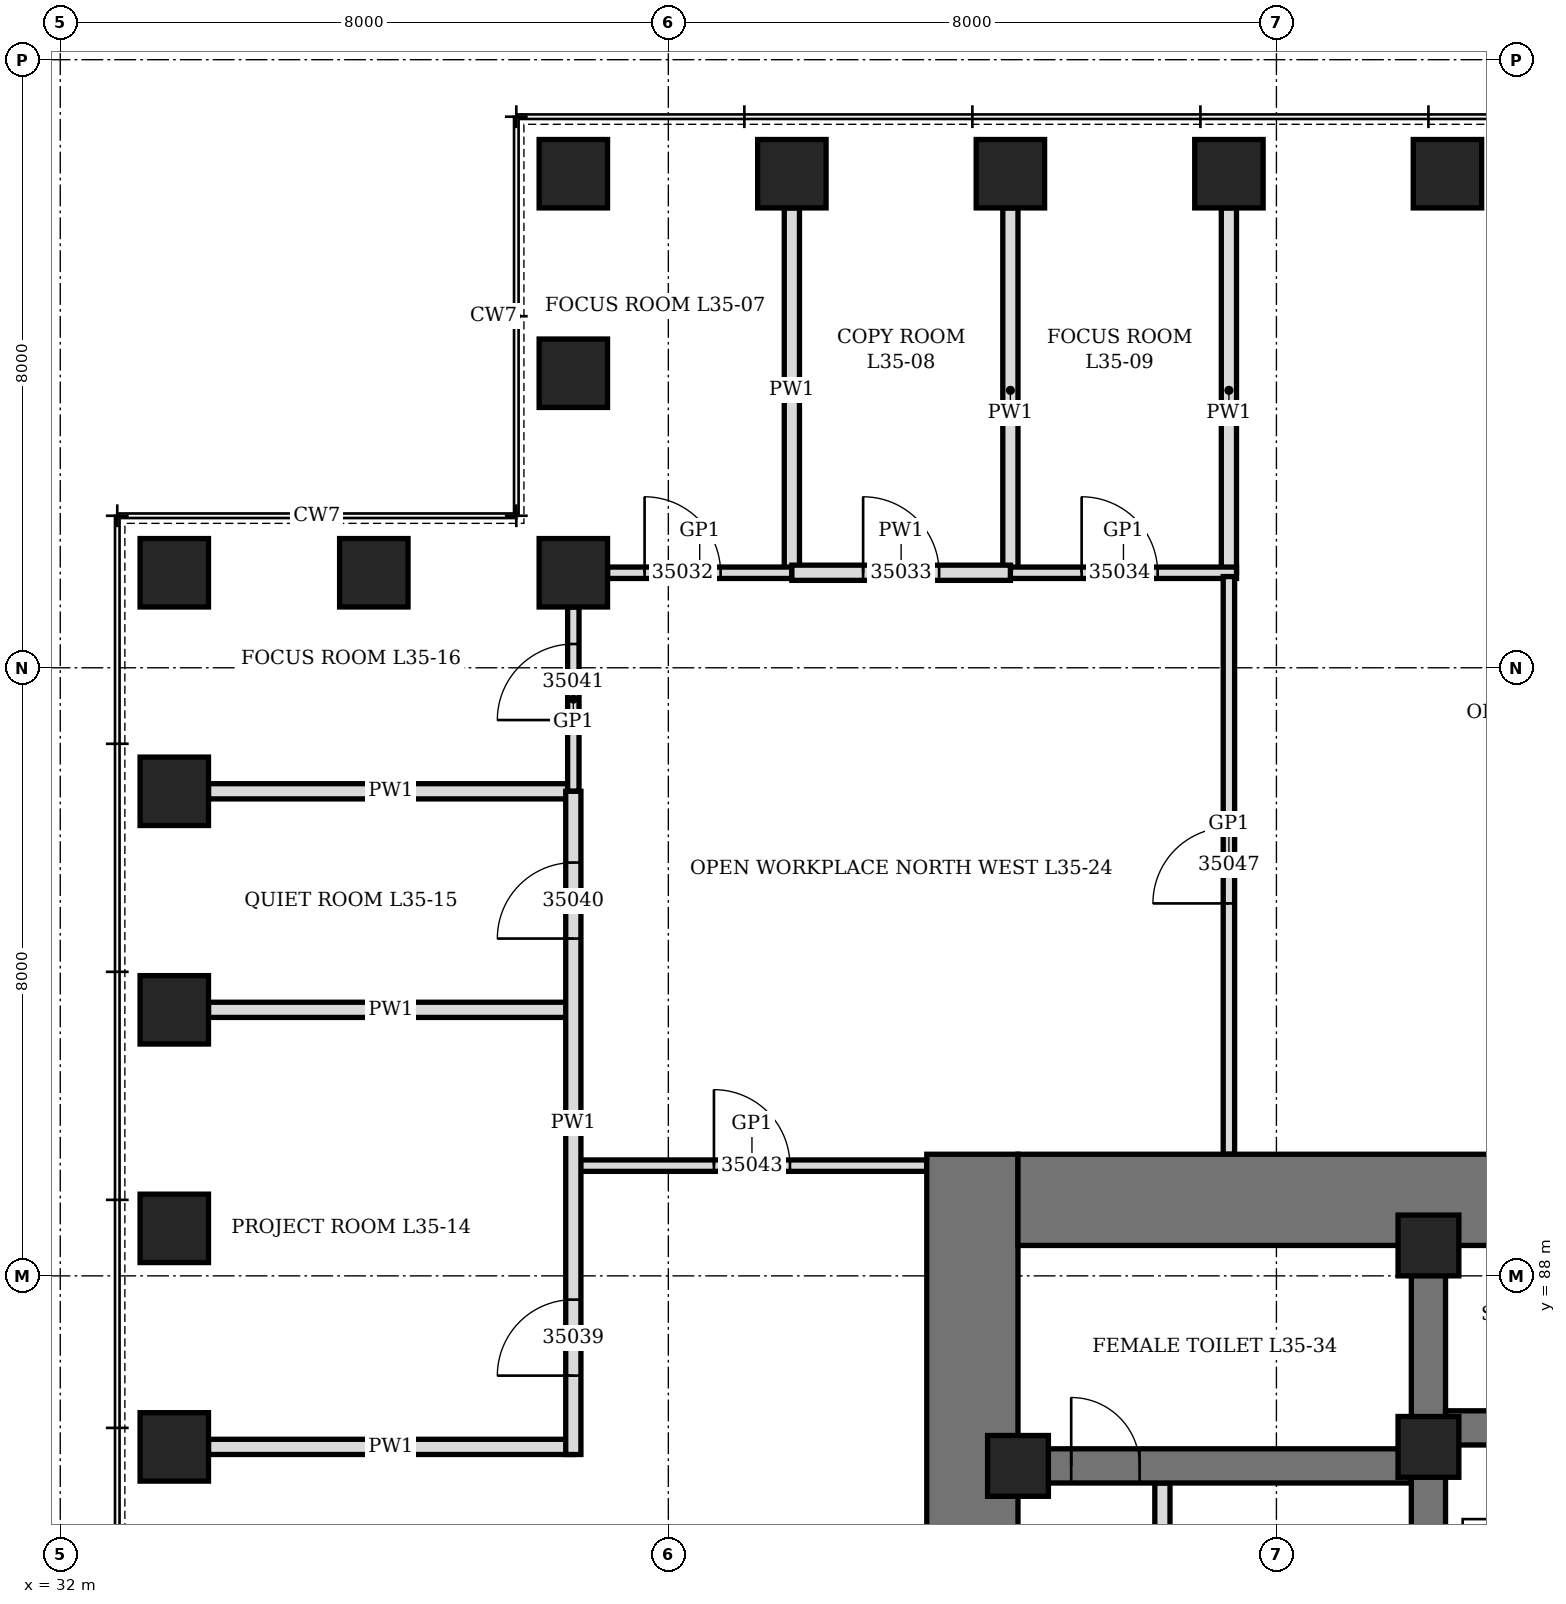
"""IFC4 building model, lengths in metres.
Left out: names, types, materials, properties, quantities, classifications, styles, units other than length and angle.
Written with IfcOpenShell. Run it as: python <this file> out.ifc"""

import sys

from ifc_helpers import new_model, si_unit, direction, frame, frame_2d, origin, origin_2d, place, context, subcontext, project, spatial, rectangle, hollow_rectangle, extrude, element, fill, save


model = new_model("IFC4")
c1 = context("Model", 3, precision=1e-05, world=origin(), true_north=direction((0.0, 1.0)))
c2 = subcontext(c1, "Body", "Model", "MODEL_VIEW")
j1 = project(units=[si_unit("LENGTHUNIT", "METRE"), si_unit("PLANEANGLEUNIT", "RADIAN")], contexts=[c1])
p1 = place(None, origin())
s1 = spatial("IfcSite", under=j1, at=p1, CompositionType="ELEMENT")
p2 = place(p1, origin())
s2 = spatial("IfcBuilding", under=s1, at=p2, CompositionType="ELEMENT")
p3 = place(p2, frame((0.0, 0.0, 158.5)))
s3 = spatial("IfcBuildingStorey", under=s2, at=p3, CompositionType="ELEMENT", Elevation=158.5)
for number, where, z_axis, x_axis in (
    (1, (50.25, 102.5, 0.0), (0.0, 0.0, 1.0), (1.0, 0.0, 0.0)),
    (2, (47.375, 102.5, 0.0), (0.0, 0.0, 1.0), (1.0, 0.0, 0.0)),
    (3, (44.5, 102.5, 0.0), (0.0, 0.0, 1.0), (1.0, 0.0, 0.0)),
    (4, (41.625, 102.5, 0.0), (0.0, 0.0, 1.0), (1.0, 0.0, 0.0)),
    (5, (38.75, 102.5, 0.0), (0.0, 0.0, 1.0), (0.0, 1.0, 0.0)),
    (6, (38.75, 99.875, 0.0), (0.0, 0.0, 1.0), (0.0, 1.0, 0.0)),
    (7, (38.75, 97.25, 0.0), (0.0, 0.0, 1.0), (1.0, 0.0, 0.0)),
    (8, (36.125, 97.25, 0.0), (0.0, 0.0, 1.0), (1.0, 0.0, 0.0)),
    (9, (33.5, 97.25, 0.0), (0.0, 0.0, 1.0), (0.0, 1.0, 0.0)),
    (10, (33.5, 94.375, 0.0), (0.0, 0.0, 1.0), (0.0, 1.0, 0.0)),
    (11, (33.5, 91.5, 0.0), (0.0, 0.0, 1.0), (0.0, 1.0, 0.0)),
    (12, (33.5, 88.625, 0.0), (0.0, 0.0, 1.0), (0.0, 1.0, 0.0)),
    (13, (33.5, 85.75, 0.0), (0.0, 0.0, 1.0), (0.0, 1.0, 0.0)),
):
    element("IfcColumn", number, at=place(p3, frame(where, z_axis=z_axis, x_axis=x_axis)), inside=s3, PredefinedType="COLUMN", context=c2, shape_type="SweptSolid", body=[
        extrude(hollow_rectangle(XDim=0.9, YDim=0.9, WallThickness=0.12, at=origin_2d()), origin(), (0.0, 0.0, 1.0), 4.2),
    ])
p4 = place(p3, frame((44.0, 70.4, 0.0), z_axis=(0.0, 0.0, 1.0), x_axis=(0.0, 1.0, 0.0)))
e14 = element("IfcWall", 14, at=p4, inside=s3, PredefinedType="SHEAR", context=c2, shape_type="SweptSolid", body=[
    extrude(rectangle(XDim=19.2, YDim=1.2, at=frame_2d((9.6, 0.0))), origin(), (0.0, 0.0, 1.0), 4.2),
])
p5 = place(p4, frame((8.6, 0.0, 0.0)))
e15 = element("IfcOpeningElement", 15, at=p5, cuts=e14, PredefinedType="OPENING", context=c2, shape_type="SweptSolid", body=[
    extrude(rectangle(XDim=2.0, YDim=2.4, at=frame_2d((1.0, 1.2))), frame((0.0, 0.61, 0.0), z_axis=(0.0, -1.0, 0.0), x_axis=(1.0, 0.0, 0.0)), (0.0, 0.0, 1.0), 1.22),
])
p6 = place(p3, frame((44.6, 89.0, 0.0), z_axis=(0.0, 0.0, 1.0), x_axis=(1.0, 0.0, 0.0)))
e16 = element("IfcWall", 16, at=p6, inside=s3, PredefinedType="SHEAR", context=c2, shape_type="SweptSolid", body=[
    extrude(rectangle(XDim=22.8, YDim=1.2, at=frame_2d((11.4, 0.0))), origin(), (0.0, 0.0, 1.0), 4.2),
])
p7 = place(p6, frame((9.475, 0.0, 0.0)))
e17 = element("IfcOpeningElement", 17, at=p7, cuts=e16, PredefinedType="OPENING", context=c2, shape_type="SweptSolid", body=[
    extrude(rectangle(XDim=1.0, YDim=2.1, at=frame_2d((0.5, 1.05))), frame((0.0, 0.61, 0.0), z_axis=(0.0, -1.0, 0.0), x_axis=(1.0, 0.0, 0.0)), (0.0, 0.0, 1.0), 1.22),
])
p8 = place(p6, frame((6.65, 0.0, 0.0)))
e18 = element("IfcOpeningElement", 18, at=p8, cuts=e16, PredefinedType="OPENING", context=c2, shape_type="SweptSolid", body=[
    extrude(rectangle(XDim=0.9, YDim=2.1, at=frame_2d((0.45, 1.05))), frame((0.0, 0.61, 0.0), z_axis=(0.0, -1.0, 0.0), x_axis=(1.0, 0.0, 0.0)), (0.0, 0.0, 1.0), 1.22),
])
p9 = place(p6, frame((12.025, 0.0, 0.0)))
e19 = element("IfcOpeningElement", 19, at=p9, cuts=e16, PredefinedType="OPENING", context=c2, shape_type="SweptSolid", body=[
    extrude(rectangle(XDim=0.9, YDim=2.1, at=frame_2d((0.45, 1.05))), frame((0.0, 0.61, 0.0), z_axis=(0.0, -1.0, 0.0), x_axis=(1.0, 0.0, 0.0)), (0.0, 0.0, 1.0), 1.22),
])
p10 = place(p6, frame((13.962, 0.0, 0.0)))
e20 = element("IfcOpeningElement", 20, at=p10, cuts=e16, PredefinedType="OPENING", context=c2, shape_type="SweptSolid", body=[
    extrude(rectangle(XDim=0.9, YDim=2.1, at=frame_2d((0.45, 1.05))), frame((0.0, 0.61, 0.0), z_axis=(0.0, -1.0, 0.0), x_axis=(1.0, 0.0, 0.0)), (0.0, 0.0, 1.0), 1.22),
])
p11 = place(p3, frame((50.0, 71.6, 0.0), z_axis=(0.0, 0.0, 1.0), x_axis=(0.0, 1.0, 0.0)))
e21 = element("IfcWall", 21, at=p11, inside=s3, PredefinedType="SHEAR", context=c2, shape_type="SweptSolid", body=[
    extrude(rectangle(XDim=16.8, YDim=0.45, at=frame_2d((8.4, 0.0))), origin(), (0.0, 0.0, 1.0), 4.2),
])
p12 = place(p11, frame((7.5, 0.0, 0.0)))
e22 = element("IfcOpeningElement", 22, at=p12, cuts=e21, PredefinedType="OPENING", context=c2, shape_type="SweptSolid", body=[
    extrude(rectangle(XDim=1.8, YDim=2.4, at=frame_2d((0.9, 1.2))), frame((0.0, 0.235, 0.0), z_axis=(0.0, -1.0, 0.0), x_axis=(1.0, 0.0, 0.0)), (0.0, 0.0, 1.0), 0.47),
])
p13 = place(p3, frame((44.6, 85.5, 0.0), z_axis=(0.0, 0.0, 1.0), x_axis=(1.0, 0.0, 0.0)))
e23 = element("IfcWall", 23, at=p13, inside=s3, PredefinedType="SHEAR", context=c2, shape_type="SweptSolid", body=[
    extrude(rectangle(XDim=5.175, YDim=0.45, at=frame_2d((2.587, 0.0))), origin(), (0.0, 0.0, 1.0), 4.2),
])
p14 = place(p13, frame((0.7, 0.0, 0.0)))
e24 = element("IfcOpeningElement", 24, at=p14, cuts=e23, PredefinedType="OPENING", context=c2, shape_type="SweptSolid", body=[
    extrude(rectangle(XDim=0.9, YDim=2.1, at=frame_2d((0.45, 1.05))), frame((0.0, 0.235, 0.0), z_axis=(0.0, -1.0, 0.0), x_axis=(1.0, 0.0, 0.0)), (0.0, 0.0, 1.0), 0.47),
])
p15 = place(p3, frame((50.225, 86.0, 0.0), z_axis=(0.0, 0.0, 1.0), x_axis=(1.0, 0.0, 0.0)))
e25 = element("IfcWall", 25, at=p15, inside=s3, PredefinedType="SHEAR", context=c2, shape_type="SweptSolid", body=[
    extrude(rectangle(XDim=11.55, YDim=0.45, at=frame_2d((5.775, 0.0))), origin(), (0.0, 0.0, 1.0), 4.2),
])
for number, where, z_axis, x_axis in (
    (26, (44.6, 85.5, 0.0), (0.0, 0.0, 1.0), (1.0, 0.0, 0.0)),
    (27, (50.0, 85.75, 0.0), (0.0, 0.0, 1.0), (1.0, 0.0, 0.0)),
    (28, (50.0, 88.4, 0.0), (0.0, 0.0, 1.0), (1.0, 0.0, 0.0)),
):
    element("IfcColumn", number, at=place(p3, frame(where, z_axis=z_axis, x_axis=x_axis)), inside=s3, PredefinedType="COLUMN", context=c2, shape_type="SweptSolid", body=[
        extrude(hollow_rectangle(XDim=0.8, YDim=0.8, WallThickness=0.1, at=origin_2d()), origin(), (0.0, 0.0, 1.0), 4.2),
    ])
p16 = place(p3, frame((46.5, 82.225, 0.0), z_axis=(0.0, 0.0, 1.0), x_axis=(0.0, 1.0, 0.0)))
e29 = element("IfcWall", 29, at=p16, inside=s3, PredefinedType="PARTITIONING", context=c2, shape_type="SweptSolid", body=[
    extrude(rectangle(XDim=3.05, YDim=0.2, at=frame_2d((1.525, 0.0))), origin(), (0.0, 0.0, 1.0), 4.04),
])
p17 = place(p16, frame((1.075, 0.0, 0.0)))
e30 = element("IfcOpeningElement", 30, at=p17, cuts=e29, PredefinedType="OPENING", context=c2, shape_type="SweptSolid", body=[
    extrude(rectangle(XDim=0.9, YDim=2.1, at=frame_2d((0.45, 1.05))), frame((0.0, 0.11, 0.0), z_axis=(0.0, -1.0, 0.0), x_axis=(1.0, 0.0, 0.0)), (0.0, 0.0, 1.0), 0.22),
])
p18 = place(p3, frame((41.625, 97.25, 0.0), z_axis=(0.0, 0.0, 1.0), x_axis=(0.0, 1.0, 0.0)))
e31 = element("IfcWall", 31, at=p18, inside=s3, PredefinedType="PARTITIONING", context=c2, shape_type="SweptSolid", body=[
    extrude(rectangle(XDim=4.8, YDim=0.2, at=frame_2d((2.4, 0.0))), origin(), (0.0, 0.0, 1.0), 3.428),
])
p19 = place(p3, frame((44.5, 97.25, 0.0), z_axis=(0.0, 0.0, 1.0), x_axis=(0.0, 1.0, 0.0)))
e32 = element("IfcWall", 32, at=p19, inside=s3, PredefinedType="PARTITIONING", context=c2, shape_type="SweptSolid", body=[
    extrude(rectangle(XDim=4.8, YDim=0.2, at=frame_2d((2.4, 0.0))), origin(), (0.0, 0.0, 1.0), 2.74),
])
p20 = place(p3, frame((47.375, 97.25, 0.0), z_axis=(0.0, 0.0, 1.0), x_axis=(0.0, 1.0, 0.0)))
e33 = element("IfcWall", 33, at=p20, inside=s3, PredefinedType="PARTITIONING", context=c2, shape_type="SweptSolid", body=[
    extrude(rectangle(XDim=4.8, YDim=0.2, at=frame_2d((2.4, 0.0))), origin(), (0.0, 0.0, 1.0), 3.278),
])
for number, where, z_axis, x_axis in (
    (34, (33.95, 85.75, 0.0), (0.0, 0.0, 1.0), (1.0, 0.0, 0.0)),
    (35, (33.95, 91.5, 0.0), (0.0, 0.0, 1.0), (1.0, 0.0, 0.0)),
    (36, (33.95, 94.375, 0.0), (0.0, 0.0, 1.0), (1.0, 0.0, 0.0)),
):
    element("IfcWall", number, at=place(p3, frame(where, z_axis=z_axis, x_axis=x_axis)), inside=s3, PredefinedType="PARTITIONING", context=c2, shape_type="SweptSolid", body=[
        extrude(rectangle(XDim=4.8, YDim=0.2, at=frame_2d((2.4, 0.0))), origin(), (0.0, 0.0, 1.0), 3.428),
    ])
p21 = place(p3, frame((38.8, 89.45, 0.0), z_axis=(0.0, 0.0, 1.0), x_axis=(1.0, 0.0, 0.0)))
e37 = element("IfcWall", 37, at=p21, inside=s3, PredefinedType="PARTITIONING", context=c2, shape_type="SweptSolid", body=[
    extrude(rectangle(XDim=4.6, YDim=0.15, at=frame_2d((2.3, 0.0))), origin(), (0.0, 0.0, 1.0), 4.04),
])
p22 = place(p21, frame((1.8, 0.0, 0.0)))
e38 = element("IfcOpeningElement", 38, at=p22, cuts=e37, PredefinedType="OPENING", context=c2, shape_type="SweptSolid", body=[
    extrude(rectangle(XDim=1.0, YDim=2.4, at=frame_2d((0.5, 1.2))), frame((0.0, 0.085, 0.0), z_axis=(0.0, -1.0, 0.0), x_axis=(1.0, 0.0, 0.0)), (0.0, 0.0, 1.0), 0.17),
])
p23 = place(p3, frame((39.2, 97.25, 0.0), z_axis=(0.0, 0.0, 1.0), x_axis=(1.0, 0.0, 0.0)))
e39 = element("IfcWall", 39, at=p23, inside=s3, PredefinedType="PARTITIONING", context=c2, shape_type="SweptSolid", body=[
    extrude(rectangle(XDim=2.425, YDim=0.15, at=frame_2d((1.212, 0.0))), origin(), (0.0, 0.0, 1.0), 4.04),
])
p24 = place(p23, frame((0.488, 0.0, 0.0)))
e40 = element("IfcOpeningElement", 40, at=p24, cuts=e39, PredefinedType="OPENING", context=c2, shape_type="SweptSolid", body=[
    extrude(rectangle(XDim=1.0, YDim=2.4, at=frame_2d((0.5, 1.2))), frame((0.0, 0.085, 0.0), z_axis=(0.0, -1.0, 0.0), x_axis=(1.0, 0.0, 0.0)), (0.0, 0.0, 1.0), 0.17),
])
p25 = place(p3, frame((44.5, 97.25, 0.0), z_axis=(0.0, 0.0, 1.0), x_axis=(1.0, 0.0, 0.0)))
e41 = element("IfcWall", 41, at=p25, inside=s3, PredefinedType="PARTITIONING", context=c2, shape_type="SweptSolid", body=[
    extrude(rectangle(XDim=2.975, YDim=0.15, at=frame_2d((1.488, 0.0))), origin(), (0.0, 0.0, 1.0), 4.04),
])
p26 = place(p25, frame((0.938, 0.0, 0.0)))
e42 = element("IfcOpeningElement", 42, at=p26, cuts=e41, PredefinedType="OPENING", context=c2, shape_type="SweptSolid", body=[
    extrude(rectangle(XDim=1.0, YDim=2.4, at=frame_2d((0.5, 1.2))), frame((0.0, 0.085, 0.0), z_axis=(0.0, -1.0, 0.0), x_axis=(1.0, 0.0, 0.0)), (0.0, 0.0, 1.0), 0.17),
])
p27 = place(p3, frame((41.625, 97.25, 0.0), z_axis=(0.0, 0.0, 1.0), x_axis=(1.0, 0.0, 0.0)))
e43 = element("IfcWall", 43, at=p27, inside=s3, PredefinedType="PARTITIONING", context=c2, shape_type="SweptSolid", body=[
    extrude(rectangle(XDim=2.875, YDim=0.2, at=frame_2d((1.438, 0.0))), origin(), (0.0, 0.0, 1.0), 4.04),
])
p28 = place(p27, frame((0.938, 0.0, 0.0)))
e44 = element("IfcOpeningElement", 44, at=p28, cuts=e43, PredefinedType="OPENING", context=c2, shape_type="SweptSolid", body=[
    extrude(rectangle(XDim=1.0, YDim=2.1, at=frame_2d((0.5, 1.05))), frame((0.0, 0.11, 0.0), z_axis=(0.0, -1.0, 0.0), x_axis=(1.0, 0.0, 0.0)), (0.0, 0.0, 1.0), 0.22),
])
p29 = place(p3, frame((38.75, 94.375, 0.0), z_axis=(0.0, 0.0, 1.0), x_axis=(0.0, 1.0, 0.0)))
e45 = element("IfcWall", 45, at=p29, inside=s3, PredefinedType="PARTITIONING", context=c2, shape_type="SweptSolid", body=[
    extrude(rectangle(XDim=2.425, YDim=0.15, at=frame_2d((1.212, 0.0))), origin(), (0.0, 0.0, 1.0), 4.04),
])
p30 = place(p29, frame((0.938, 0.0, 0.0)))
e46 = element("IfcOpeningElement", 46, at=p30, cuts=e45, PredefinedType="OPENING", context=c2, shape_type="SweptSolid", body=[
    extrude(rectangle(XDim=1.0, YDim=2.4, at=frame_2d((0.5, 1.2))), frame((0.0, 0.085, 0.0), z_axis=(0.0, -1.0, 0.0), x_axis=(1.0, 0.0, 0.0)), (0.0, 0.0, 1.0), 0.17),
])
p31 = place(p3, frame((38.75, 85.65, 0.0), z_axis=(0.0, 0.0, 1.0), x_axis=(0.0, 1.0, 0.0)))
e47 = element("IfcWall", 47, at=p31, inside=s3, PredefinedType="PARTITIONING", context=c2, shape_type="SweptSolid", body=[
    extrude(rectangle(XDim=8.725, YDim=0.2, at=frame_2d((4.363, 0.0))), origin(), (0.0, 0.0, 1.0), 4.04),
])
p32 = place(p31, frame((1.038, 0.0, 0.0)))
e48 = element("IfcOpeningElement", 48, at=p32, cuts=e47, PredefinedType="OPENING", context=c2, shape_type="SweptSolid", body=[
    extrude(rectangle(XDim=1.0, YDim=2.1, at=frame_2d((0.5, 1.05))), frame((0.0, 0.11, 0.0), z_axis=(0.0, -1.0, 0.0), x_axis=(1.0, 0.0, 0.0)), (0.0, 0.0, 1.0), 0.22),
])
p33 = place(p31, frame((6.788, 0.0, 0.0)))
e49 = element("IfcOpeningElement", 49, at=p33, cuts=e47, PredefinedType="OPENING", context=c2, shape_type="SweptSolid", body=[
    extrude(rectangle(XDim=1.0, YDim=2.1, at=frame_2d((0.5, 1.05))), frame((0.0, 0.11, 0.0), z_axis=(0.0, -1.0, 0.0), x_axis=(1.0, 0.0, 0.0)), (0.0, 0.0, 1.0), 0.22),
])
p34 = place(p3, frame((47.375, 89.6, 0.0), z_axis=(0.0, 0.0, 1.0), x_axis=(0.0, 1.0, 0.0)))
e50 = element("IfcWall", 50, at=p34, inside=s3, PredefinedType="PARTITIONING", context=c2, shape_type="SweptSolid", body=[
    extrude(rectangle(XDim=7.6, YDim=0.15, at=frame_2d((3.8, 0.0))), origin(), (0.0, 0.0, 1.0), 3.278),
])
p35 = place(p34, frame((3.3, 0.0, 0.0)))
e51 = element("IfcOpeningElement", 51, at=p35, cuts=e50, PredefinedType="OPENING", context=c2, shape_type="SweptSolid", body=[
    extrude(rectangle(XDim=1.0, YDim=2.4, at=frame_2d((0.5, 1.2))), frame((0.0, 0.085, 0.0), z_axis=(0.0, -1.0, 0.0), x_axis=(1.0, 0.0, 0.0)), (0.0, 0.0, 1.0), 0.17),
])
p36 = place(p14, origin())
e52 = element("IfcDoor", 52, at=p36, inside=s3, OperationType="SINGLE_SWING_RIGHT", PredefinedType="DOOR", context=c2, shape_type="SweptSolid", body=[
    extrude(rectangle(XDim=0.9, YDim=2.1, at=frame_2d((0.45, 1.05))), frame((0.0, 0.225, 0.0), z_axis=(0.0, -1.0, 0.0), x_axis=(1.0, 0.0, 0.0)), (0.0, 0.0, 1.0), 0.449),
])
fill(e24, e52)
p37 = place(p24, origin())
e53 = element("IfcDoor", 53, at=p37, inside=s3, OperationType="SINGLE_SWING_RIGHT", PredefinedType="DOOR", context=c2, shape_type="SweptSolid", body=[
    extrude(rectangle(XDim=1.0, YDim=2.4, at=frame_2d((0.5, 1.2))), frame((0.0, 0.075, 0.0), z_axis=(0.0, -1.0, 0.0), x_axis=(1.0, 0.0, 0.0)), (0.0, 0.0, 1.0), 0.149),
])
fill(e40, e53)
p38 = place(p28, origin())
e54 = element("IfcDoor", 54, at=p38, inside=s3, OperationType="SINGLE_SWING_LEFT", PredefinedType="DOOR", context=c2, shape_type="SweptSolid", body=[
    extrude(rectangle(XDim=1.0, YDim=2.1, at=frame_2d((0.5, 1.05))), frame((0.0, 0.1, 0.0), z_axis=(0.0, -1.0, 0.0), x_axis=(1.0, 0.0, 0.0)), (0.0, 0.0, 1.0), 0.199),
])
fill(e44, e54)
p39 = place(p26, origin())
e55 = element("IfcDoor", 55, at=p39, inside=s3, OperationType="SINGLE_SWING_RIGHT", PredefinedType="DOOR", context=c2, shape_type="SweptSolid", body=[
    extrude(rectangle(XDim=1.0, YDim=2.4, at=frame_2d((0.5, 1.2))), frame((0.0, 0.075, 0.0), z_axis=(0.0, -1.0, 0.0), x_axis=(1.0, 0.0, 0.0)), (0.0, 0.0, 1.0), 0.149),
])
fill(e42, e55)
p40 = place(p32, origin())
e56 = element("IfcDoor", 56, at=p40, inside=s3, OperationType="SINGLE_SWING_LEFT", PredefinedType="DOOR", context=c2, shape_type="SweptSolid", body=[
    extrude(rectangle(XDim=1.0, YDim=2.1, at=frame_2d((0.5, 1.05))), frame((0.0, 0.1, 0.0), z_axis=(0.0, -1.0, 0.0), x_axis=(1.0, 0.0, 0.0)), (0.0, 0.0, 1.0), 0.199),
])
fill(e48, e56)
p41 = place(p33, origin())
e57 = element("IfcDoor", 57, at=p41, inside=s3, OperationType="SINGLE_SWING_LEFT", PredefinedType="DOOR", context=c2, shape_type="SweptSolid", body=[
    extrude(rectangle(XDim=1.0, YDim=2.1, at=frame_2d((0.5, 1.05))), frame((0.0, 0.1, 0.0), z_axis=(0.0, -1.0, 0.0), x_axis=(1.0, 0.0, 0.0)), (0.0, 0.0, 1.0), 0.199),
])
fill(e49, e57)
p42 = place(p30, origin())
e58 = element("IfcDoor", 58, at=p42, inside=s3, OperationType="SINGLE_SWING_RIGHT", PredefinedType="DOOR", context=c2, shape_type="SweptSolid", body=[
    extrude(rectangle(XDim=1.0, YDim=2.4, at=frame_2d((0.5, 1.2))), frame((0.0, 0.075, 0.0), z_axis=(0.0, -1.0, 0.0), x_axis=(1.0, 0.0, 0.0)), (0.0, 0.0, 1.0), 0.149),
])
fill(e46, e58)
p43 = place(p22, origin())
e59 = element("IfcDoor", 59, at=p43, inside=s3, OperationType="SINGLE_SWING_RIGHT", PredefinedType="DOOR", context=c2, shape_type="SweptSolid", body=[
    extrude(rectangle(XDim=1.0, YDim=2.4, at=frame_2d((0.5, 1.2))), frame((0.0, 0.075, 0.0), z_axis=(0.0, -1.0, 0.0), x_axis=(1.0, 0.0, 0.0)), (0.0, 0.0, 1.0), 0.149),
])
fill(e38, e59)
p44 = place(p35, origin())
e60 = element("IfcDoor", 60, at=p44, inside=s3, OperationType="SINGLE_SWING_RIGHT", PredefinedType="DOOR", context=c2, shape_type="SweptSolid", body=[
    extrude(rectangle(XDim=1.0, YDim=2.4, at=frame_2d((0.5, 1.2))), frame((0.0, 0.075, 0.0), z_axis=(0.0, -1.0, 0.0), x_axis=(1.0, 0.0, 0.0)), (0.0, 0.0, 1.0), 0.149),
])
fill(e51, e60)
save(model, sys.argv[1])
